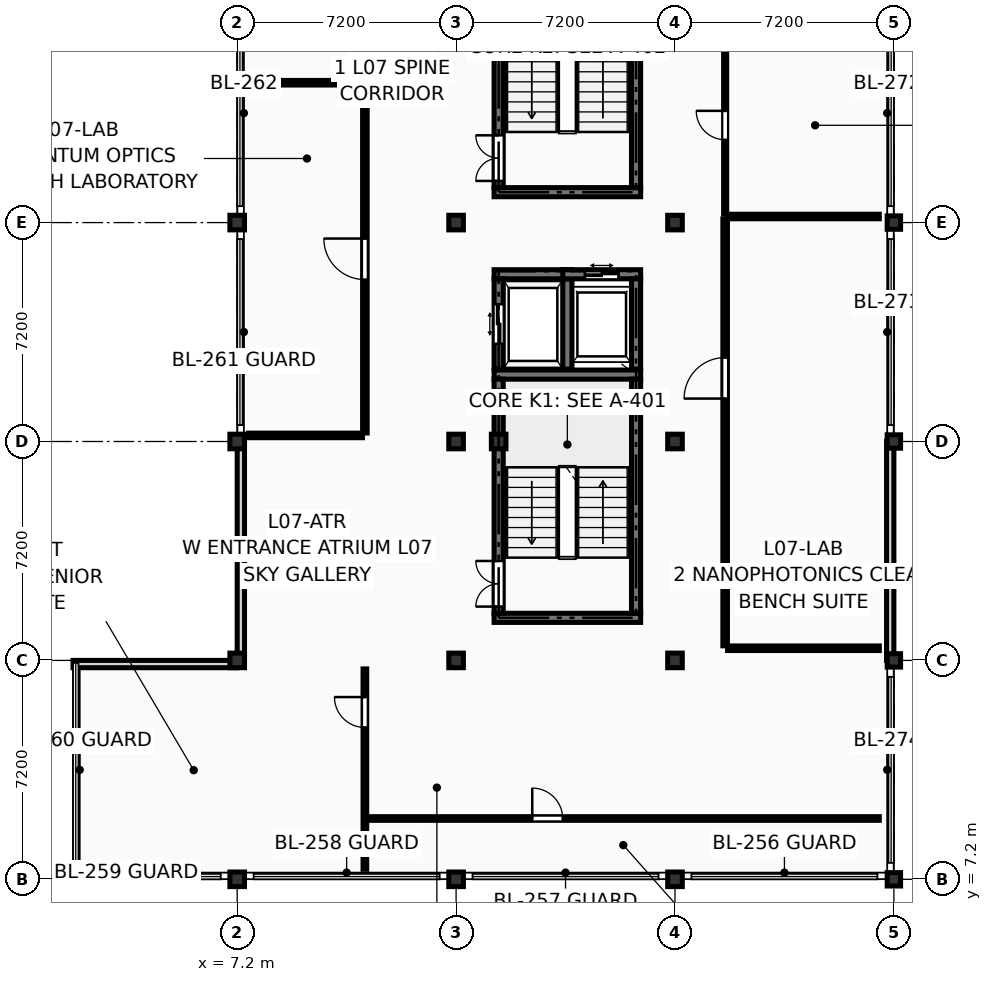
"""IFC4 building model, lengths in metres.
Left out: names, types, materials, properties, quantities, classifications, styles, units other than length and angle.
Written with IfcOpenShell. Run it as: python <this file> out.ifc"""

import sys

from ifc_helpers import new_model, si_unit, direction, frame, frame_2d, origin, origin_2d, place, context, subcontext, project, spatial, rectangle, extrude, element, fill, save


model = new_model("IFC4")
c1 = context("Model", 3, precision=1e-05, world=origin(), true_north=direction((0.0, 1.0)))
c2 = subcontext(c1, "Body", "Model", "MODEL_VIEW")
j1 = project(units=[si_unit("LENGTHUNIT", "METRE"), si_unit("PLANEANGLEUNIT", "RADIAN")], contexts=[c1])
p1 = place(None, origin())
s1 = spatial("IfcSite", under=j1, at=p1, CompositionType="ELEMENT")
p2 = place(p1, origin())
s2 = spatial("IfcBuilding", under=s1, at=p2, CompositionType="ELEMENT")
p3 = place(p2, frame((0.0, 0.0, 26.25)))
s3 = spatial("IfcBuildingStorey", under=s2, at=p3, CompositionType="ELEMENT", Elevation=26.25)
for number, where, z_axis, x_axis in (
    (1, (7.2, 7.2, 0.0), (0.0, 0.0, 1.0), (1.0, 0.0, 0.0)),
    (2, (7.2, 14.4, 0.0), (0.0, 0.0, 1.0), (1.0, 0.0, 0.0)),
    (3, (7.2, 21.6, 0.0), (0.0, 0.0, 1.0), (1.0, 0.0, 0.0)),
    (4, (7.2, 28.8, 0.0), (0.0, 0.0, 1.0), (1.0, 0.0, 0.0)),
    (5, (14.4, 7.2, 0.0), (0.0, 0.0, 1.0), (1.0, 0.0, 0.0)),
    (6, (14.4, 14.4, 0.0), (0.0, 0.0, 1.0), (1.0, 0.0, 0.0)),
    (7, (14.4, 21.6, 0.0), (0.0, 0.0, 1.0), (1.0, 0.0, 0.0)),
    (8, (14.4, 28.8, 0.0), (0.0, 0.0, 1.0), (1.0, 0.0, 0.0)),
    (9, (15.8, 21.6, 0.0), (0.0, 0.0, 1.0), (1.0, 0.0, 0.0)),
    (10, (21.6, 7.2, 0.0), (0.0, 0.0, 1.0), (1.0, 0.0, 0.0)),
    (11, (21.6, 14.4, 0.0), (0.0, 0.0, 1.0), (1.0, 0.0, 0.0)),
    (12, (21.6, 21.6, 0.0), (0.0, 0.0, 1.0), (1.0, 0.0, 0.0)),
    (13, (21.6, 28.8, 0.0), (0.0, 0.0, 1.0), (1.0, 0.0, 0.0)),
):
    element("IfcColumn", number, at=place(p3, frame(where, z_axis=z_axis, x_axis=x_axis)), inside=s3, PredefinedType="COLUMN", context=c2, shape_type="SweptSolid", body=[
        extrude(rectangle(XDim=0.48, YDim=0.48, at=origin_2d()), origin(), (0.0, 0.0, 1.0), 3.45),
    ])
for number, where, z_axis, x_axis in (
    (14, (28.8, 7.2, 0.0), (0.0, 0.0, 1.0), (1.0, 0.0, 0.0)),
    (15, (28.8, 14.4, 0.0), (0.0, 0.0, 1.0), (1.0, 0.0, 0.0)),
    (16, (28.8, 21.6, 0.0), (0.0, 0.0, 1.0), (1.0, 0.0, 0.0)),
    (17, (28.8, 28.8, 0.0), (0.0, 0.0, 1.0), (1.0, 0.0, 0.0)),
):
    element("IfcColumn", number, at=place(p3, frame(where, z_axis=z_axis, x_axis=x_axis)), inside=s3, PredefinedType="COLUMN", context=c2, shape_type="SweptSolid", body=[
        extrude(rectangle(XDim=0.44, YDim=0.44, at=origin_2d()), origin(), (0.0, 0.0, 1.0), 3.45),
    ])
p4 = place(p3, frame((1.8, 14.28, 0.0), z_axis=(0.0, 0.0, 1.0), x_axis=(1.0, 0.0, 0.0)))
e18 = element("IfcWall", 18, at=p4, inside=s3, PredefinedType="SOLIDWALL", context=c2, shape_type="SweptSolid", body=[
    extrude(rectangle(XDim=5.4, YDim=0.24, at=frame_2d((2.7, 0.0))), origin(), (0.0, 0.0, 1.0), 2.546),
])
for number, where, z_axis, x_axis in (
    (19, (7.32, 14.4, 0.0), (0.0, 0.0, 1.0), (0.0, 1.0, 0.0)),
    (20, (28.68, 14.4, 0.0), (0.0, 0.0, 1.0), (0.0, 1.0, 0.0)),
):
    element("IfcWall", number, at=place(p3, frame(where, z_axis=z_axis, x_axis=x_axis)), inside=s3, PredefinedType="SOLIDWALL", context=c2, shape_type="SweptSolid", body=[
        extrude(rectangle(XDim=7.2, YDim=0.24, at=frame_2d((3.6, 0.0))), origin(), (0.0, 0.0, 1.0), 2.69),
    ])
for number, where, z_axis, x_axis in (
    (21, (15.65, 15.8, 0.0), (0.0, 0.0, 1.0), (1.0, 0.0, 0.0)),
    (22, (15.65, 23.8, 0.0), (0.0, 0.0, 1.0), (1.0, 0.0, 0.0)),
):
    element("IfcWall", number, at=place(p3, frame(where, z_axis=z_axis, x_axis=x_axis)), inside=s3, PredefinedType="SHEAR", context=c2, shape_type="SweptSolid", body=[
        extrude(rectangle(XDim=4.82, YDim=0.3, at=frame_2d((2.41, 0.0))), origin(), (0.0, 0.0, 1.0), 3.24),
    ])
p5 = place(p3, frame((15.8, 15.95, 0.0), z_axis=(0.0, 0.0, 1.0), x_axis=(0.0, 1.0, 0.0)))
e23 = element("IfcWall", 23, at=p5, inside=s3, PredefinedType="SHEAR", context=c2, shape_type="SweptSolid", body=[
    extrude(rectangle(XDim=7.7, YDim=0.3, at=frame_2d((3.85, 0.0))), origin(), (0.0, 0.0, 1.0), 3.24),
])
p6 = place(p5, frame((0.22, 0.0, 0.0)))
e24 = element("IfcOpeningElement", 24, at=p6, cuts=e23, PredefinedType="OPENING", context=c2, shape_type="SweptSolid", body=[
    extrude(rectangle(XDim=1.5, YDim=2.2, at=frame_2d((0.75, 1.1))), frame((0.0, 0.162, 0.0), z_axis=(0.0, -1.0, 0.0), x_axis=(1.0, 0.0, 0.0)), (0.0, 0.0, 1.0), 0.324),
])
p7 = place(p3, frame((20.32, 15.95, 0.0), z_axis=(0.0, 0.0, 1.0), x_axis=(0.0, 1.0, 0.0)))
e25 = element("IfcWall", 25, at=p7, inside=s3, PredefinedType="SHEAR", context=c2, shape_type="SweptSolid", body=[
    extrude(rectangle(XDim=7.7, YDim=0.3, at=frame_2d((3.85, 0.0))), origin(), (0.0, 0.0, 1.0), 3.24),
])
p8 = place(p3, frame((15.65, 29.8, 0.0), z_axis=(0.0, 0.0, 1.0), x_axis=(1.0, 0.0, 0.0)))
e26 = element("IfcWall", 26, at=p8, inside=s3, PredefinedType="SHEAR", context=c2, shape_type="SweptSolid", body=[
    extrude(rectangle(XDim=4.82, YDim=0.3, at=frame_2d((2.41, 0.0))), origin(), (0.0, 0.0, 1.0), 3.24),
])
p9 = place(p3, frame((15.8, 29.95, 0.0), z_axis=(0.0, 0.0, 1.0), x_axis=(0.0, 1.0, 0.0)))
e27 = element("IfcWall", 27, at=p9, inside=s3, PredefinedType="SHEAR", context=c2, shape_type="SweptSolid", body=[
    extrude(rectangle(XDim=7.7, YDim=0.3, at=frame_2d((3.85, 0.0))), origin(), (0.0, 0.0, 1.0), 3.24),
])
p10 = place(p9, frame((0.22, 0.0, 0.0)))
e28 = element("IfcOpeningElement", 28, at=p10, cuts=e27, PredefinedType="OPENING", context=c2, shape_type="SweptSolid", body=[
    extrude(rectangle(XDim=1.5, YDim=2.2, at=frame_2d((0.75, 1.1))), frame((0.0, 0.162, 0.0), z_axis=(0.0, -1.0, 0.0), x_axis=(1.0, 0.0, 0.0)), (0.0, 0.0, 1.0), 0.324),
])
p11 = place(p3, frame((20.32, 29.95, 0.0), z_axis=(0.0, 0.0, 1.0), x_axis=(0.0, 1.0, 0.0)))
e29 = element("IfcWall", 29, at=p11, inside=s3, PredefinedType="SHEAR", context=c2, shape_type="SweptSolid", body=[
    extrude(rectangle(XDim=7.7, YDim=0.3, at=frame_2d((3.85, 0.0))), origin(), (0.0, 0.0, 1.0), 3.24),
])
p12 = place(p3, frame((15.65, 27.1, 0.0), z_axis=(0.0, 0.0, 1.0), x_axis=(1.0, 0.0, 0.0)))
e30 = element("IfcWall", 30, at=p12, inside=s3, PredefinedType="SHEAR", context=c2, shape_type="SweptSolid", body=[
    extrude(rectangle(XDim=2.56, YDim=0.3, at=frame_2d((1.28, 0.0))), origin(), (0.0, 0.0, 1.0), 3.24),
])
p13 = place(p3, frame((15.8, 23.98, 0.0), z_axis=(0.0, 0.0, 1.0), x_axis=(0.0, 1.0, 0.0)))
e31 = element("IfcWall", 31, at=p13, inside=s3, PredefinedType="SHEAR", context=c2, shape_type="SweptSolid", body=[
    extrude(rectangle(XDim=2.97, YDim=0.3, at=frame_2d((1.485, 0.0))), origin(), (0.0, 0.0, 1.0), 3.24),
])
p14 = place(p13, frame((0.835, 0.0, 0.0)))
e32 = element("IfcOpeningElement", 32, at=p14, cuts=e31, PredefinedType="OPENING", context=c2, shape_type="SweptSolid", body=[
    extrude(rectangle(XDim=1.3, YDim=2.25, at=frame_2d((0.65, 1.125))), frame((0.0, 0.162, 0.0), z_axis=(0.0, -1.0, 0.0), x_axis=(1.0, 0.0, 0.0)), (0.0, 0.0, 1.0), 0.324),
])
p15 = place(p3, frame((18.06, 23.98, 0.0), z_axis=(0.0, 0.0, 1.0), x_axis=(0.0, 1.0, 0.0)))
e33 = element("IfcWall", 33, at=p15, inside=s3, PredefinedType="SHEAR", context=c2, shape_type="SweptSolid", body=[
    extrude(rectangle(XDim=2.97, YDim=0.3, at=frame_2d((1.485, 0.0))), origin(), (0.0, 0.0, 1.0), 3.24),
])
p16 = place(p3, frame((17.91, 27.1, 0.0), z_axis=(0.0, 0.0, 1.0), x_axis=(1.0, 0.0, 0.0)))
e34 = element("IfcWall", 34, at=p16, inside=s3, PredefinedType="SHEAR", context=c2, shape_type="SweptSolid", body=[
    extrude(rectangle(XDim=2.56, YDim=0.3, at=frame_2d((1.28, 0.0))), origin(), (0.0, 0.0, 1.0), 3.24),
])
p17 = place(p16, frame((0.73, 0.0, 0.0)))
e35 = element("IfcOpeningElement", 35, at=p17, cuts=e34, PredefinedType="OPENING", context=c2, shape_type="SweptSolid", body=[
    extrude(rectangle(XDim=1.1, YDim=2.2, at=frame_2d((0.55, 1.1))), frame((0.0, 0.162, 0.0), z_axis=(0.0, -1.0, 0.0), x_axis=(1.0, 0.0, 0.0)), (0.0, 0.0, 1.0), 0.324),
])
p18 = place(p3, frame((20.32, 23.98, 0.0), z_axis=(0.0, 0.0, 1.0), x_axis=(0.0, 1.0, 0.0)))
e36 = element("IfcWall", 36, at=p18, inside=s3, PredefinedType="SHEAR", context=c2, shape_type="SweptSolid", body=[
    extrude(rectangle(XDim=2.97, YDim=0.3, at=frame_2d((1.485, 0.0))), origin(), (0.0, 0.0, 1.0), 3.24),
])
p19 = place(p3, frame((11.4, 7.53, 0.0), z_axis=(0.0, 0.0, 1.0), x_axis=(0.0, 1.0, 0.0)))
e37 = element("IfcWall", 37, at=p19, inside=s3, PredefinedType="PARTITIONING", context=c2, shape_type="SweptSolid", body=[
    extrude(rectangle(XDim=6.59, YDim=0.12, at=frame_2d((3.295, 0.0))), origin(), (0.0, 0.0, 1.0), 3.225),
])
p20 = place(p19, frame((4.664, 0.0, 0.0)))
e38 = element("IfcOpeningElement", 38, at=p20, cuts=e37, PredefinedType="OPENING", context=c2, shape_type="SweptSolid", body=[
    extrude(rectangle(XDim=1.0, YDim=2.15, at=frame_2d((0.5, 1.075))), frame((0.0, 0.072, 0.0), z_axis=(0.0, -1.0, 0.0), x_axis=(1.0, 0.0, 0.0)), (0.0, 0.0, 1.0), 0.144),
])
p21 = place(p3, frame((11.5, 9.2, 0.0), z_axis=(0.0, 0.0, 1.0), x_axis=(1.0, 0.0, 0.0)))
e39 = element("IfcWall", 39, at=p21, inside=s3, PredefinedType="PARTITIONING", context=c2, shape_type="SweptSolid", body=[
    extrude(rectangle(XDim=16.82, YDim=0.12, at=frame_2d((8.41, 0.0))), origin(), (0.0, 0.0, 1.0), 3.225),
])
p22 = place(p21, frame((5.405, 0.0, 0.0)))
e40 = element("IfcOpeningElement", 40, at=p22, cuts=e39, PredefinedType="OPENING", context=c2, shape_type="SweptSolid", body=[
    extrude(rectangle(XDim=1.0, YDim=2.15, at=frame_2d((0.5, 1.075))), frame((0.0, 0.072, 0.0), z_axis=(0.0, -1.0, 0.0), x_axis=(1.0, 0.0, 0.0)), (0.0, 0.0, 1.0), 0.144),
])
p23 = place(p3, frame((7.58, 21.8, 0.0), z_axis=(0.0, 0.0, 1.0), x_axis=(1.0, 0.0, 0.0)))
e41 = element("IfcWall", 41, at=p23, inside=s3, PredefinedType="PARTITIONING", context=c2, shape_type="SweptSolid", body=[
    extrude(rectangle(XDim=3.74, YDim=0.15, at=frame_2d((1.87, 0.0))), origin(), (0.0, 0.0, 1.0), 2.541),
])
p24 = place(p3, frame((11.4, 21.88, 0.0), z_axis=(0.0, 0.0, 1.0), x_axis=(0.0, 1.0, 0.0)))
e42 = element("IfcWall", 42, at=p24, inside=s3, PredefinedType="PARTITIONING", context=c2, shape_type="SweptSolid", body=[
    extrude(rectangle(XDim=11.44, YDim=0.15, at=frame_2d((5.72, 0.0))), origin(), (0.0, 0.0, 1.0), 3.225),
])
p25 = place(p24, frame((5.045, 0.0, 0.0)))
e43 = element("IfcOpeningElement", 43, at=p25, cuts=e42, PredefinedType="OPENING", context=c2, shape_type="SweptSolid", body=[
    extrude(rectangle(XDim=1.35, YDim=2.2, at=frame_2d((0.675, 1.1))), frame((0.0, 0.087, 0.0), z_axis=(0.0, -1.0, 0.0), x_axis=(1.0, 0.0, 0.0)), (0.0, 0.0, 1.0), 0.174),
])
p26 = place(p3, frame((7.58, 33.4, 0.0), z_axis=(0.0, 0.0, 1.0), x_axis=(1.0, 0.0, 0.0)))
e44 = element("IfcWall", 44, at=p26, inside=s3, PredefinedType="PARTITIONING", context=c2, shape_type="SweptSolid", body=[
    extrude(rectangle(XDim=3.74, YDim=0.15, at=frame_2d((1.87, 0.0))), origin(), (0.0, 0.0, 1.0), 3.225),
])
p27 = place(p3, frame((11.4, 33.48, 0.0), z_axis=(0.0, 0.0, 1.0), x_axis=(0.0, 1.0, 0.0)))
e45 = element("IfcWall", 45, at=p27, inside=s3, PredefinedType="PARTITIONING", context=c2, shape_type="SweptSolid", body=[
    extrude(rectangle(XDim=11.24, YDim=0.12, at=frame_2d((5.62, 0.0))), origin(), (0.0, 0.0, 1.0), 3.225),
])
p28 = place(p27, frame((4.96, 0.0, 0.0)))
e46 = element("IfcOpeningElement", 46, at=p28, cuts=e45, PredefinedType="OPENING", context=c2, shape_type="SweptSolid", body=[
    extrude(rectangle(XDim=1.32, YDim=2.2, at=frame_2d((0.66, 1.1))), frame((0.0, 0.072, 0.0), z_axis=(0.0, -1.0, 0.0), x_axis=(1.0, 0.0, 0.0)), (0.0, 0.0, 1.0), 0.144),
])
p29 = place(p3, frame((23.25, 14.88, 0.0), z_axis=(0.0, 0.0, 1.0), x_axis=(0.0, 1.0, 0.0)))
e47 = element("IfcWall", 47, at=p29, inside=s3, PredefinedType="PARTITIONING", context=c2, shape_type="SweptSolid", body=[
    extrude(rectangle(XDim=14.04, YDim=0.15, at=frame_2d((7.02, 0.0))), origin(), (0.0, 0.0, 1.0), 3.225),
])
p30 = place(p29, frame((8.132, 0.0, 0.0)))
e48 = element("IfcOpeningElement", 48, at=p30, cuts=e47, PredefinedType="OPENING", context=c2, shape_type="SweptSolid", body=[
    extrude(rectangle(XDim=1.35, YDim=2.2, at=frame_2d((0.675, 1.1))), frame((0.0, 0.087, 0.0), z_axis=(0.0, -1.0, 0.0), x_axis=(1.0, 0.0, 0.0)), (0.0, 0.0, 1.0), 0.174),
])
p31 = place(p3, frame((23.33, 14.8, 0.0), z_axis=(0.0, 0.0, 1.0), x_axis=(1.0, 0.0, 0.0)))
e49 = element("IfcWall", 49, at=p31, inside=s3, PredefinedType="PARTITIONING", context=c2, shape_type="SweptSolid", body=[
    extrude(rectangle(XDim=4.99, YDim=0.15, at=frame_2d((2.495, 0.0))), origin(), (0.0, 0.0, 1.0), 3.225),
])
p32 = place(p3, frame((23.33, 29.0, 0.0), z_axis=(0.0, 0.0, 1.0), x_axis=(1.0, 0.0, 0.0)))
e50 = element("IfcWall", 50, at=p32, inside=s3, PredefinedType="PARTITIONING", context=c2, shape_type="SweptSolid", body=[
    extrude(rectangle(XDim=4.99, YDim=0.15, at=frame_2d((2.495, 0.0))), origin(), (0.0, 0.0, 1.0), 2.541),
])
p33 = place(p3, frame((23.25, 29.08, 0.0), z_axis=(0.0, 0.0, 1.0), x_axis=(0.0, 1.0, 0.0)))
e51 = element("IfcWall", 51, at=p33, inside=s3, PredefinedType="PARTITIONING", context=c2, shape_type="SweptSolid", body=[
    extrude(rectangle(XDim=5.84, YDim=0.1, at=frame_2d((2.92, 0.0))), origin(), (0.0, 0.0, 1.0), 3.225),
])
p34 = place(p33, frame((2.445, 0.0, 0.0)))
e52 = element("IfcOpeningElement", 52, at=p34, cuts=e51, PredefinedType="OPENING", context=c2, shape_type="SweptSolid", body=[
    extrude(rectangle(XDim=0.95, YDim=2.1, at=frame_2d((0.475, 1.05))), frame((0.0, 0.062, 0.0), z_axis=(0.0, -1.0, 0.0), x_axis=(1.0, 0.0, 0.0)), (0.0, 0.0, 1.0), 0.124),
])
p35 = place(p6, origin())
e53 = element("IfcDoor", 53, at=p35, inside=s3, OperationType="DOUBLE_DOOR_SINGLE_SWING", PredefinedType="DOOR", context=c2, shape_type="SweptSolid", body=[
    extrude(rectangle(XDim=1.5, YDim=2.2, at=frame_2d((0.75, 1.1))), frame((0.0, 0.025, 0.0), z_axis=(0.0, -1.0, 0.0), x_axis=(1.0, 0.0, 0.0)), (0.0, 0.0, 1.0), 0.05),
])
fill(e24, e53)
p36 = place(p10, origin())
e54 = element("IfcDoor", 54, at=p36, inside=s3, OperationType="DOUBLE_DOOR_SINGLE_SWING", PredefinedType="DOOR", context=c2, shape_type="SweptSolid", body=[
    extrude(rectangle(XDim=1.5, YDim=2.2, at=frame_2d((0.75, 1.1))), frame((0.0, 0.025, 0.0), z_axis=(0.0, -1.0, 0.0), x_axis=(1.0, 0.0, 0.0)), (0.0, 0.0, 1.0), 0.05),
])
fill(e28, e54)
p37 = place(p14, origin())
e55 = element("IfcDoor", 55, at=p37, inside=s3, OperationType="DOUBLE_DOOR_SLIDING", PredefinedType="DOOR", context=c2, shape_type="SweptSolid", body=[
    extrude(rectangle(XDim=1.3, YDim=2.25, at=frame_2d((0.65, 1.125))), frame((0.0, 0.025, 0.0), z_axis=(0.0, -1.0, 0.0), x_axis=(1.0, 0.0, 0.0)), (0.0, 0.0, 1.0), 0.05),
])
fill(e32, e55)
p38 = place(p17, origin())
e56 = element("IfcDoor", 56, at=p38, inside=s3, OperationType="DOUBLE_DOOR_SLIDING", PredefinedType="DOOR", context=c2, shape_type="SweptSolid", body=[
    extrude(rectangle(XDim=1.1, YDim=2.2, at=frame_2d((0.55, 1.1))), frame((0.0, 0.025, 0.0), z_axis=(0.0, -1.0, 0.0), x_axis=(1.0, 0.0, 0.0)), (0.0, 0.0, 1.0), 0.05),
])
fill(e35, e56)
p39 = place(p20, origin())
e57 = element("IfcDoor", 57, at=p39, inside=s3, OperationType="SINGLE_SWING_RIGHT", PredefinedType="DOOR", context=c2, shape_type="SweptSolid", body=[
    extrude(rectangle(XDim=1.0, YDim=2.15, at=frame_2d((0.5, 1.075))), frame((0.0, 0.025, 0.0), z_axis=(0.0, -1.0, 0.0), x_axis=(1.0, 0.0, 0.0)), (0.0, 0.0, 1.0), 0.05),
])
fill(e38, e57)
p40 = place(p22, origin())
e58 = element("IfcDoor", 58, at=p40, inside=s3, OperationType="SINGLE_SWING_LEFT", PredefinedType="DOOR", context=c2, shape_type="SweptSolid", body=[
    extrude(rectangle(XDim=1.0, YDim=2.15, at=frame_2d((0.5, 1.075))), frame((0.0, 0.025, 0.0), z_axis=(0.0, -1.0, 0.0), x_axis=(1.0, 0.0, 0.0)), (0.0, 0.0, 1.0), 0.05),
])
fill(e40, e58)
p41 = place(p25, origin())
e59 = element("IfcDoor", 59, at=p41, inside=s3, OperationType="SINGLE_SWING_RIGHT", PredefinedType="DOOR", context=c2, shape_type="SweptSolid", body=[
    extrude(rectangle(XDim=1.35, YDim=2.2, at=frame_2d((0.675, 1.1))), frame((0.0, 0.025, 0.0), z_axis=(0.0, -1.0, 0.0), x_axis=(1.0, 0.0, 0.0)), (0.0, 0.0, 1.0), 0.05),
])
fill(e43, e59)
p42 = place(p30, origin())
e60 = element("IfcDoor", 60, at=p42, inside=s3, OperationType="SINGLE_SWING_LEFT", PredefinedType="DOOR", context=c2, shape_type="SweptSolid", body=[
    extrude(rectangle(XDim=1.35, YDim=2.2, at=frame_2d((0.675, 1.1))), frame((0.0, 0.025, 0.0), z_axis=(0.0, -1.0, 0.0), x_axis=(1.0, 0.0, 0.0)), (0.0, 0.0, 1.0), 0.05),
])
fill(e48, e60)
p43 = place(p34, origin())
e61 = element("IfcDoor", 61, at=p43, inside=s3, OperationType="SINGLE_SWING_RIGHT", PredefinedType="DOOR", context=c2, shape_type="SweptSolid", body=[
    extrude(rectangle(XDim=0.95, YDim=2.1, at=frame_2d((0.475, 1.05))), frame((0.0, 0.025, 0.0), z_axis=(0.0, -1.0, 0.0), x_axis=(1.0, 0.0, 0.0)), (0.0, 0.0, 1.0), 0.05),
])
fill(e52, e61)
save(model, sys.argv[1])
